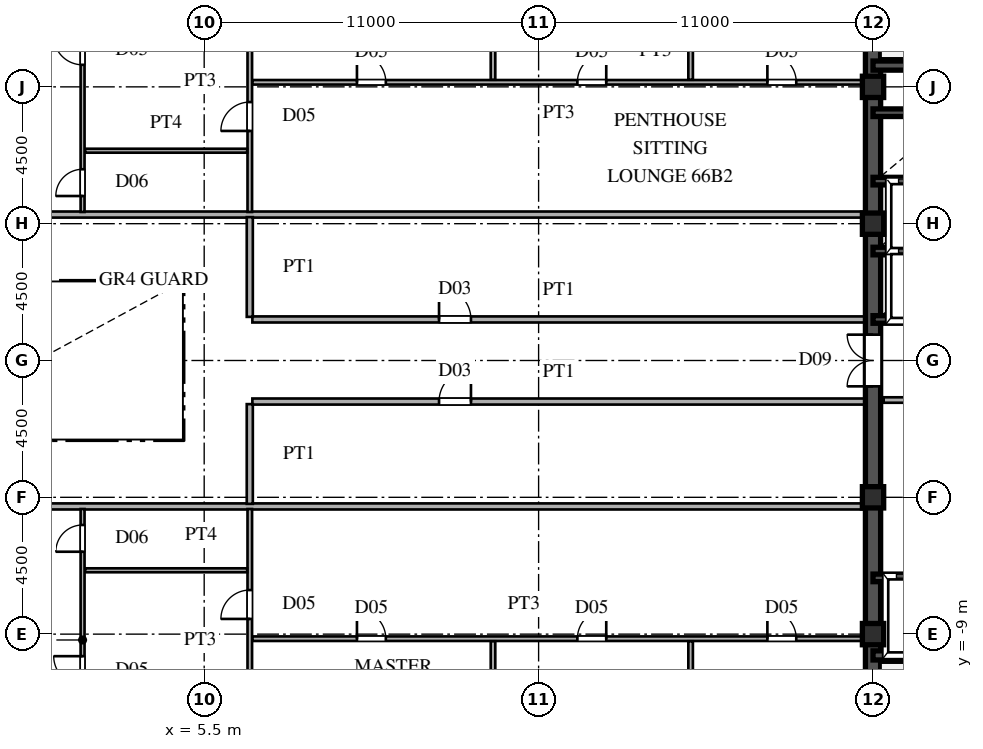
"""IFC4 building model, lengths in metres.
Left out: names, types, materials, properties, quantities, classifications, styles, units other than length and angle.
Written with IfcOpenShell. Run it as: python <this file> out.ifc"""

import sys

from ifc_helpers import new_model, si_unit, direction, frame, frame_2d, origin, origin_2d, place, context, subcontext, project, spatial, rectangle, hollow_rectangle, extrude, source, transform, mapped, element, fill, save


model = new_model("IFC4")
c1 = context("Model", 3, precision=1e-05, world=origin(), true_north=direction((0.0, 1.0)))
c2 = subcontext(c1, "Body", "Model", "MODEL_VIEW")
j1 = project(units=[si_unit("LENGTHUNIT", "METRE"), si_unit("PLANEANGLEUNIT", "RADIAN")], contexts=[c1])
p1 = place(None, origin())
s1 = spatial("IfcSite", under=j1, at=p1, CompositionType="ELEMENT")
p2 = place(p1, origin())
s2 = spatial("IfcBuilding", under=s1, at=p2, CompositionType="ELEMENT")
p3 = place(p2, frame((0.0, 0.0, 250.65)))
s3 = spatial("IfcBuildingStorey", under=s2, at=p3, CompositionType="ELEMENT", Elevation=250.65)
m1 = source(origin(), c2, "Body", "SweptSolid", [
    extrude(hollow_rectangle(XDim=0.7, YDim=0.7, WallThickness=0.03, at=origin_2d()), origin(), (0.0, 0.0, 1.0), 3.75),
])
for number, where, z_axis, x_axis in (
    (1, (27.5, -9.0, 0.0), (0.0, 0.0, 1.0), (1.0, 0.0, 0.0)),
    (2, (27.5, -4.5, 0.0), (0.0, 0.0, 1.0), (1.0, 0.0, 0.0)),
    (3, (27.5, 4.5, 0.0), (0.0, 0.0, 1.0), (1.0, 0.0, 0.0)),
    (4, (27.5, 9.0, 0.0), (0.0, 0.0, 1.0), (1.0, 0.0, 0.0)),
):
    element("IfcColumn", number, at=place(p3, frame(where, z_axis=z_axis, x_axis=x_axis)), inside=s3, PredefinedType="COLUMN", context=c2, shape_type="MappedRepresentation", body=[
        mapped(m1, transform((0.0, 0.0, 0.0), scale=1.0)),
    ])
for number, where, z_axis, x_axis in (
    (5, (27.5, -13.5, 0.0), (0.0, 0.0, 1.0), (0.0, 1.0, 0.0)),
    (6, (27.5, 1.3, 0.0), (0.0, 0.0, 1.0), (0.0, 1.0, 0.0)),
):
    element("IfcWall", number, at=place(p3, frame(where, z_axis=z_axis, x_axis=x_axis)), inside=s3, PredefinedType="SHEAR", context=c2, shape_type="SweptSolid", body=[
        extrude(rectangle(XDim=12.2, YDim=0.5, at=frame_2d((6.1, 0.0))), origin(), (0.0, 0.0, 1.0), 3.53),
    ])
p4 = place(p3, frame((27.5, -1.3, 0.0), z_axis=(0.0, 0.0, 1.0), x_axis=(0.0, 1.0, 0.0)))
e7 = element("IfcWall", 7, at=p4, inside=s3, PredefinedType="SHEAR", context=c2, shape_type="SweptSolid", body=[
    extrude(rectangle(XDim=2.6, YDim=0.5, at=frame_2d((1.3, 0.0))), origin(), (0.0, 0.0, 1.0), 3.53),
])
p5 = place(p4, frame((0.45, 0.0, 0.0)))
e8 = element("IfcOpeningElement", 8, at=p5, cuts=e7, PredefinedType="OPENING", context=c2, shape_type="SweptSolid", body=[
    extrude(rectangle(XDim=1.7, YDim=2.35, at=frame_2d((0.85, 1.175))), frame((0.0, 0.26, 0.0), z_axis=(0.0, -1.0, 0.0), x_axis=(1.0, 0.0, 0.0)), (0.0, 0.0, 1.0), 0.52),
])
p6 = place(p3, frame((27.5, -9.7, 0.0), z_axis=(0.0, 0.0, 1.0), x_axis=(1.0, 0.0, 0.0)))
e9 = element("IfcWall", 9, at=p6, inside=s3, PredefinedType="SHEAR", context=c2, shape_type="SweptSolid", body=[
    extrude(rectangle(XDim=9.0, YDim=0.3, at=frame_2d((4.5, 0.0))), origin(), (0.0, 0.0, 1.0), 3.53),
])
p7 = place(p6, frame((7.3, 0.0, 0.0)))
e10 = element("IfcOpeningElement", 10, at=p7, cuts=e9, PredefinedType="OPENING", context=c2, shape_type="SweptSolid", body=[
    extrude(rectangle(XDim=1.1, YDim=2.2, at=frame_2d((0.55, 1.1))), frame((0.0, 0.16, 0.0), z_axis=(0.0, -1.0, 0.0), x_axis=(1.0, 0.0, 0.0)), (0.0, 0.0, 1.0), 0.32),
])
p8 = place(p3, frame((27.5, 9.7, 0.0), z_axis=(0.0, 0.0, 1.0), x_axis=(1.0, 0.0, 0.0)))
e11 = element("IfcWall", 11, at=p8, inside=s3, PredefinedType="SHEAR", context=c2, shape_type="SweptSolid", body=[
    extrude(rectangle(XDim=9.0, YDim=0.3, at=frame_2d((4.5, 0.0))), origin(), (0.0, 0.0, 1.0), 3.53),
])
p9 = place(p8, frame((7.3, 0.0, 0.0)))
e12 = element("IfcOpeningElement", 12, at=p9, cuts=e11, PredefinedType="OPENING", context=c2, shape_type="SweptSolid", body=[
    extrude(rectangle(XDim=1.1, YDim=2.2, at=frame_2d((0.55, 1.1))), frame((0.0, 0.16, 0.0), z_axis=(0.0, -1.0, 0.0), x_axis=(1.0, 0.0, 0.0)), (0.0, 0.0, 1.0), 0.32),
])
for number, where, z_axis, x_axis in (
    (13, (27.5, -7.15, 0.0), (0.0, 0.0, 1.0), (1.0, 0.0, 0.0)),
    (14, (27.5, 1.35, 0.0), (0.0, 0.0, 1.0), (1.0, 0.0, 0.0)),
    (15, (27.5, 3.6, 0.0), (0.0, 0.0, 1.0), (1.0, 0.0, 0.0)),
    (16, (27.5, 5.9, 0.0), (0.0, 0.0, 1.0), (1.0, 0.0, 0.0)),
    (17, (27.5, 8.15, 0.0), (0.0, 0.0, 1.0), (1.0, 0.0, 0.0)),
):
    element("IfcWall", number, at=place(p3, frame(where, z_axis=z_axis, x_axis=x_axis)), inside=s3, PredefinedType="SHEAR", context=c2, shape_type="SweptSolid", body=[
        extrude(rectangle(XDim=2.8, YDim=0.25, at=frame_2d((1.4, 0.0))), origin(), (0.0, 0.0, 1.0), 3.53),
    ])
p10 = place(p3, frame((27.85, -1.3, 0.0), z_axis=(0.0, 0.0, 1.0), x_axis=(1.0, 0.0, 0.0)))
e18 = element("IfcWall", 18, at=p10, inside=s3, PredefinedType="PARTITIONING", context=c2, shape_type="SweptSolid", body=[
    extrude(rectangle(XDim=5.17, YDim=0.18, at=frame_2d((2.585, 0.0))), origin(), (0.0, 0.0, 1.0), 3.53),
])
p11 = place(p10, frame((2.01, 0.0, 0.0)))
e19 = element("IfcOpeningElement", 19, at=p11, cuts=e18, PredefinedType="OPENING", context=c2, shape_type="SweptSolid", body=[
    extrude(rectangle(XDim=1.15, YDim=2.2, at=frame_2d((0.575, 1.1))), frame((0.0, 0.1, 0.0), z_axis=(0.0, -1.0, 0.0), x_axis=(1.0, 0.0, 0.0)), (0.0, 0.0, 1.0), 0.2),
])
p12 = place(p3, frame((7.085, -9.15, 0.0), z_axis=(0.0, 0.0, 1.0), x_axis=(1.0, 0.0, 0.0)))
e20 = element("IfcWall", 20, at=p12, inside=s3, PredefinedType="PARTITIONING", context=c2, shape_type="SweptSolid", body=[
    extrude(rectangle(XDim=20.16, YDim=0.15, at=frame_2d((10.08, 0.0))), origin(), (0.0, 0.0, 1.0), 3.53),
])
p13 = place(p12, frame((3.44, 0.0, 0.0)))
e21 = element("IfcOpeningElement", 21, at=p13, cuts=e20, PredefinedType="OPENING", context=c2, shape_type="SweptSolid", body=[
    extrude(rectangle(XDim=0.95, YDim=2.15, at=frame_2d((0.475, 1.075))), frame((0.0, 0.085, 0.0), z_axis=(0.0, -1.0, 0.0), x_axis=(1.0, 0.0, 0.0)), (0.0, 0.0, 1.0), 0.17),
])
p14 = place(p12, frame((10.69, 0.0, 0.0)))
e22 = element("IfcOpeningElement", 22, at=p14, cuts=e20, PredefinedType="OPENING", context=c2, shape_type="SweptSolid", body=[
    extrude(rectangle(XDim=0.95, YDim=2.15, at=frame_2d((0.475, 1.075))), frame((0.0, 0.085, 0.0), z_axis=(0.0, -1.0, 0.0), x_axis=(1.0, 0.0, 0.0)), (0.0, 0.0, 1.0), 0.17),
])
p15 = place(p12, frame((16.94, 0.0, 0.0)))
e23 = element("IfcOpeningElement", 23, at=p15, cuts=e20, PredefinedType="OPENING", context=c2, shape_type="SweptSolid", body=[
    extrude(rectangle(XDim=0.95, YDim=2.15, at=frame_2d((0.475, 1.075))), frame((0.0, 0.085, 0.0), z_axis=(0.0, -1.0, 0.0), x_axis=(1.0, 0.0, 0.0)), (0.0, 0.0, 1.0), 0.17),
])
p16 = place(p3, frame((1.585, -6.9, 0.0), z_axis=(0.0, 0.0, 1.0), x_axis=(1.0, 0.0, 0.0)))
e24 = element("IfcWall", 24, at=p16, inside=s3, PredefinedType="PARTITIONING", context=c2, shape_type="SweptSolid", body=[
    extrude(rectangle(XDim=5.33, YDim=0.13, at=frame_2d((2.665, 0.0))), origin(), (0.0, 0.0, 1.0), 3.53),
])
p17 = place(p3, frame((-27.245, -4.8, 0.0), z_axis=(0.0, 0.0, 1.0), x_axis=(1.0, 0.0, 0.0)))
e25 = element("IfcWall", 25, at=p17, inside=s3, PredefinedType="PARTITIONING", context=c2, shape_type="SweptSolid", body=[
    extrude(rectangle(XDim=54.49, YDim=0.2, at=frame_2d((27.245, 0.0))), origin(), (0.0, 0.0, 1.0), 3.53),
])
p18 = place(p17, frame((24.97, 0.0, 0.0)))
e26 = element("IfcOpeningElement", 26, at=p18, cuts=e25, PredefinedType="OPENING", context=c2, shape_type="SweptSolid", body=[
    extrude(rectangle(XDim=1.05, YDim=2.25, at=frame_2d((0.525, 1.125))), frame((0.0, 0.11, 0.0), z_axis=(0.0, -1.0, 0.0), x_axis=(1.0, 0.0, 0.0)), (0.0, 0.0, 1.0), 0.22),
])
p19 = place(p3, frame((7.085, -1.35, 0.0), z_axis=(0.0, 0.0, 1.0), x_axis=(1.0, 0.0, 0.0)))
e27 = element("IfcWall", 27, at=p19, inside=s3, PredefinedType="PARTITIONING", context=c2, shape_type="SweptSolid", body=[
    extrude(rectangle(XDim=20.16, YDim=0.2, at=frame_2d((10.08, 0.0))), origin(), (0.0, 0.0, 1.0), 3.53),
])
p20 = place(p19, frame((6.14, 0.0, 0.0)))
e28 = element("IfcOpeningElement", 28, at=p20, cuts=e27, PredefinedType="OPENING", context=c2, shape_type="SweptSolid", body=[
    extrude(rectangle(XDim=1.05, YDim=2.25, at=frame_2d((0.525, 1.125))), frame((0.0, 0.11, 0.0), z_axis=(0.0, -1.0, 0.0), x_axis=(1.0, 0.0, 0.0)), (0.0, 0.0, 1.0), 0.22),
])
p21 = place(p3, frame((7.085, 1.35, 0.0), z_axis=(0.0, 0.0, 1.0), x_axis=(1.0, 0.0, 0.0)))
e29 = element("IfcWall", 29, at=p21, inside=s3, PredefinedType="PARTITIONING", context=c2, shape_type="SweptSolid", body=[
    extrude(rectangle(XDim=20.16, YDim=0.2, at=frame_2d((10.08, 0.0))), origin(), (0.0, 0.0, 1.0), 3.53),
])
p22 = place(p21, frame((6.14, 0.0, 0.0)))
e30 = element("IfcOpeningElement", 30, at=p22, cuts=e29, PredefinedType="OPENING", context=c2, shape_type="SweptSolid", body=[
    extrude(rectangle(XDim=1.05, YDim=2.25, at=frame_2d((0.525, 1.125))), frame((0.0, 0.11, 0.0), z_axis=(0.0, -1.0, 0.0), x_axis=(1.0, 0.0, 0.0)), (0.0, 0.0, 1.0), 0.22),
])
p23 = place(p3, frame((-27.245, 4.8, 0.0), z_axis=(0.0, 0.0, 1.0), x_axis=(1.0, 0.0, 0.0)))
e31 = element("IfcWall", 31, at=p23, inside=s3, PredefinedType="PARTITIONING", context=c2, shape_type="SweptSolid", body=[
    extrude(rectangle(XDim=54.49, YDim=0.2, at=frame_2d((27.245, 0.0))), origin(), (0.0, 0.0, 1.0), 3.53),
])
p24 = place(p23, frame((24.97, 0.0, 0.0)))
e32 = element("IfcOpeningElement", 32, at=p24, cuts=e31, PredefinedType="OPENING", context=c2, shape_type="SweptSolid", body=[
    extrude(rectangle(XDim=1.05, YDim=2.25, at=frame_2d((0.525, 1.125))), frame((0.0, 0.11, 0.0), z_axis=(0.0, -1.0, 0.0), x_axis=(1.0, 0.0, 0.0)), (0.0, 0.0, 1.0), 0.22),
])
p25 = place(p3, frame((1.585, 6.9, 0.0), z_axis=(0.0, 0.0, 1.0), x_axis=(1.0, 0.0, 0.0)))
e33 = element("IfcWall", 33, at=p25, inside=s3, PredefinedType="PARTITIONING", context=c2, shape_type="SweptSolid", body=[
    extrude(rectangle(XDim=5.33, YDim=0.13, at=frame_2d((2.665, 0.0))), origin(), (0.0, 0.0, 1.0), 3.53),
])
p26 = place(p3, frame((7.085, 9.15, 0.0), z_axis=(0.0, 0.0, 1.0), x_axis=(1.0, 0.0, 0.0)))
e34 = element("IfcWall", 34, at=p26, inside=s3, PredefinedType="PARTITIONING", context=c2, shape_type="SweptSolid", body=[
    extrude(rectangle(XDim=20.16, YDim=0.15, at=frame_2d((10.08, 0.0))), origin(), (0.0, 0.0, 1.0), 3.53),
])
p27 = place(p26, frame((3.44, 0.0, 0.0)))
e35 = element("IfcOpeningElement", 35, at=p27, cuts=e34, PredefinedType="OPENING", context=c2, shape_type="SweptSolid", body=[
    extrude(rectangle(XDim=0.95, YDim=2.15, at=frame_2d((0.475, 1.075))), frame((0.0, 0.085, 0.0), z_axis=(0.0, -1.0, 0.0), x_axis=(1.0, 0.0, 0.0)), (0.0, 0.0, 1.0), 0.17),
])
p28 = place(p26, frame((10.69, 0.0, 0.0)))
e36 = element("IfcOpeningElement", 36, at=p28, cuts=e34, PredefinedType="OPENING", context=c2, shape_type="SweptSolid", body=[
    extrude(rectangle(XDim=0.95, YDim=2.15, at=frame_2d((0.475, 1.075))), frame((0.0, 0.085, 0.0), z_axis=(0.0, -1.0, 0.0), x_axis=(1.0, 0.0, 0.0)), (0.0, 0.0, 1.0), 0.17),
])
p29 = place(p26, frame((16.94, 0.0, 0.0)))
e37 = element("IfcOpeningElement", 37, at=p29, cuts=e34, PredefinedType="OPENING", context=c2, shape_type="SweptSolid", body=[
    extrude(rectangle(XDim=0.95, YDim=2.15, at=frame_2d((0.475, 1.075))), frame((0.0, 0.085, 0.0), z_axis=(0.0, -1.0, 0.0), x_axis=(1.0, 0.0, 0.0)), (0.0, 0.0, 1.0), 0.17),
])
p30 = place(p3, frame((1.5, -13.5, 0.0), z_axis=(0.0, 0.0, 1.0), x_axis=(0.0, 1.0, 0.0)))
e38 = element("IfcWall", 38, at=p30, inside=s3, PredefinedType="PARTITIONING", context=c2, shape_type="SweptSolid", body=[
    extrude(rectangle(XDim=8.615, YDim=0.13, at=frame_2d((4.308, 0.0))), origin(), (0.0, 0.0, 1.0), 3.53),
])
p31 = place(p30, frame((7.21, 0.0, 0.0)))
e39 = element("IfcOpeningElement", 39, at=p31, cuts=e38, PredefinedType="OPENING", context=c2, shape_type="SweptSolid", body=[
    extrude(rectangle(XDim=0.88, YDim=2.1, at=frame_2d((0.44, 1.05))), frame((0.0, 0.075, 0.0), z_axis=(0.0, -1.0, 0.0), x_axis=(1.0, 0.0, 0.0)), (0.0, 0.0, 1.0), 0.15),
])
p32 = place(p30, frame((2.825, 0.0, 0.0)))
e40 = element("IfcOpeningElement", 40, at=p32, cuts=e38, PredefinedType="OPENING", context=c2, shape_type="SweptSolid", body=[
    extrude(rectangle(XDim=0.95, YDim=2.15, at=frame_2d((0.475, 1.075))), frame((0.0, 0.075, 0.0), z_axis=(0.0, -1.0, 0.0), x_axis=(1.0, 0.0, 0.0)), (0.0, 0.0, 1.0), 0.15),
])
p33 = place(p3, frame((1.5, 4.885, 0.0), z_axis=(0.0, 0.0, 1.0), x_axis=(0.0, 1.0, 0.0)))
e41 = element("IfcWall", 41, at=p33, inside=s3, PredefinedType="PARTITIONING", context=c2, shape_type="SweptSolid", body=[
    extrude(rectangle(XDim=8.615, YDim=0.13, at=frame_2d((4.308, 0.0))), origin(), (0.0, 0.0, 1.0), 3.53),
])
p34 = place(p33, frame((0.525, 0.0, 0.0)))
e42 = element("IfcOpeningElement", 42, at=p34, cuts=e41, PredefinedType="OPENING", context=c2, shape_type="SweptSolid", body=[
    extrude(rectangle(XDim=0.88, YDim=2.1, at=frame_2d((0.44, 1.05))), frame((0.0, 0.075, 0.0), z_axis=(0.0, -1.0, 0.0), x_axis=(1.0, 0.0, 0.0)), (0.0, 0.0, 1.0), 0.15),
])
p35 = place(p33, frame((4.84, 0.0, 0.0)))
e43 = element("IfcOpeningElement", 43, at=p35, cuts=e41, PredefinedType="OPENING", context=c2, shape_type="SweptSolid", body=[
    extrude(rectangle(XDim=0.95, YDim=2.15, at=frame_2d((0.475, 1.075))), frame((0.0, 0.075, 0.0), z_axis=(0.0, -1.0, 0.0), x_axis=(1.0, 0.0, 0.0)), (0.0, 0.0, 1.0), 0.15),
])
p36 = place(p3, frame((7.0, -13.5, 0.0), z_axis=(0.0, 0.0, 1.0), x_axis=(0.0, 1.0, 0.0)))
e44 = element("IfcWall", 44, at=p36, inside=s3, PredefinedType="PARTITIONING", context=c2, shape_type="SweptSolid", body=[
    extrude(rectangle(XDim=8.615, YDim=0.15, at=frame_2d((4.308, 0.0))), origin(), (0.0, 0.0, 1.0), 3.53),
])
p37 = place(p36, frame((5.0, 0.0, 0.0)))
e45 = element("IfcOpeningElement", 45, at=p37, cuts=e44, PredefinedType="OPENING", context=c2, shape_type="SweptSolid", body=[
    extrude(rectangle(XDim=0.95, YDim=2.15, at=frame_2d((0.475, 1.075))), frame((0.0, 0.085, 0.0), z_axis=(0.0, -1.0, 0.0), x_axis=(1.0, 0.0, 0.0)), (0.0, 0.0, 1.0), 0.17),
])
for number, where, z_axis, x_axis in (
    (46, (7.0, -4.715, 0.0), (0.0, 0.0, 1.0), (0.0, 1.0, 0.0)),
    (47, (7.0, 1.435, 0.0), (0.0, 0.0, 1.0), (0.0, 1.0, 0.0)),
):
    element("IfcWall", number, at=place(p3, frame(where, z_axis=z_axis, x_axis=x_axis)), inside=s3, PredefinedType="PARTITIONING", context=c2, shape_type="SweptSolid", body=[
        extrude(rectangle(XDim=3.28, YDim=0.2, at=frame_2d((1.64, 0.0))), origin(), (0.0, 0.0, 1.0), 3.53),
    ])
p38 = place(p3, frame((7.0, 4.885, 0.0), z_axis=(0.0, 0.0, 1.0), x_axis=(0.0, 1.0, 0.0)))
e48 = element("IfcWall", 48, at=p38, inside=s3, PredefinedType="PARTITIONING", context=c2, shape_type="SweptSolid", body=[
    extrude(rectangle(XDim=8.615, YDim=0.15, at=frame_2d((4.308, 0.0))), origin(), (0.0, 0.0, 1.0), 3.53),
])
p39 = place(p38, frame((2.665, 0.0, 0.0)))
e49 = element("IfcOpeningElement", 49, at=p39, cuts=e48, PredefinedType="OPENING", context=c2, shape_type="SweptSolid", body=[
    extrude(rectangle(XDim=0.95, YDim=2.15, at=frame_2d((0.475, 1.075))), frame((0.0, 0.085, 0.0), z_axis=(0.0, -1.0, 0.0), x_axis=(1.0, 0.0, 0.0)), (0.0, 0.0, 1.0), 0.17),
])
for number, where, z_axis, x_axis in (
    (50, (15.0, -13.5, 0.0), (0.0, 0.0, 1.0), (0.0, 1.0, 0.0)),
    (51, (15.0, 9.235, 0.0), (0.0, 0.0, 1.0), (0.0, 1.0, 0.0)),
):
    element("IfcWall", number, at=place(p3, frame(where, z_axis=z_axis, x_axis=x_axis)), inside=s3, PredefinedType="PARTITIONING", context=c2, shape_type="SweptSolid", body=[
        extrude(rectangle(XDim=4.265, YDim=0.15, at=frame_2d((2.132, 0.0))), origin(), (0.0, 0.0, 1.0), 3.53),
    ])
for number, where, z_axis, x_axis in (
    (52, (21.5, -13.39, 0.0), (0.0, 0.0, 1.0), (0.0, 1.0, 0.0)),
    (53, (21.5, 9.235, 0.0), (0.0, 0.0, 1.0), (0.0, 1.0, 0.0)),
):
    element("IfcWall", number, at=place(p3, frame(where, z_axis=z_axis, x_axis=x_axis)), inside=s3, PredefinedType="PARTITIONING", context=c2, shape_type="SweptSolid", body=[
        extrude(rectangle(XDim=4.155, YDim=0.15, at=frame_2d((2.077, 0.0))), origin(), (0.0, 0.0, 1.0), 3.53),
    ])
m2 = source(origin(), c2, "Body", "SweptSolid", [
    extrude(rectangle(XDim=1.7, YDim=2.35, at=frame_2d((0.85, 1.175))), frame((0.0, 0.025, 0.0), z_axis=(0.0, -1.0, 0.0), x_axis=(1.0, 0.0, 0.0)), (0.0, 0.0, 1.0), 0.05),
])
p40 = place(p5, origin())
e54 = element("IfcDoor", 54, at=p40, inside=s3, OperationType="DOUBLE_SWING_LEFT", PredefinedType="DOOR", context=c2, shape_type="MappedRepresentation", body=[
    mapped(m2, transform((0.0, 0.0, 0.0), scale=1.0)),
])
fill(e8, e54)
m3 = source(origin(), c2, "Body", "SweptSolid", [
    extrude(rectangle(XDim=0.95, YDim=2.15, at=frame_2d((0.475, 1.075))), frame((0.0, 0.025, 0.0), z_axis=(0.0, -1.0, 0.0), x_axis=(1.0, 0.0, 0.0)), (0.0, 0.0, 1.0), 0.05),
])
p41 = place(p13, origin())
e55 = element("IfcDoor", 55, at=p41, inside=s3, OperationType="SINGLE_SWING_LEFT", PredefinedType="DOOR", context=c2, shape_type="MappedRepresentation", body=[
    mapped(m3, transform((0.0, 0.0, 0.0), scale=1.0)),
])
fill(e21, e55)
p42 = place(p14, origin())
e56 = element("IfcDoor", 56, at=p42, inside=s3, OperationType="SINGLE_SWING_RIGHT", PredefinedType="DOOR", context=c2, shape_type="MappedRepresentation", body=[
    mapped(m3, transform((0.0, 0.0, 0.0), scale=1.0)),
])
fill(e22, e56)
p43 = place(p15, origin())
e57 = element("IfcDoor", 57, at=p43, inside=s3, OperationType="SINGLE_SWING_LEFT", PredefinedType="DOOR", context=c2, shape_type="MappedRepresentation", body=[
    mapped(m3, transform((0.0, 0.0, 0.0), scale=1.0)),
])
fill(e23, e57)
m4 = source(origin(), c2, "Body", "SweptSolid", [
    extrude(rectangle(XDim=1.05, YDim=2.25, at=frame_2d((0.525, 1.125))), frame((0.0, 0.025, 0.0), z_axis=(0.0, -1.0, 0.0), x_axis=(1.0, 0.0, 0.0)), (0.0, 0.0, 1.0), 0.05),
])
p44 = place(p20, origin())
e58 = element("IfcDoor", 58, at=p44, inside=s3, OperationType="SINGLE_SWING_RIGHT", PredefinedType="DOOR", context=c2, shape_type="MappedRepresentation", body=[
    mapped(m4, transform((0.0, 0.0, 0.0), scale=1.0)),
])
fill(e28, e58)
p45 = place(p22, origin())
e59 = element("IfcDoor", 59, at=p45, inside=s3, OperationType="SINGLE_SWING_LEFT", PredefinedType="DOOR", context=c2, shape_type="MappedRepresentation", body=[
    mapped(m4, transform((0.0, 0.0, 0.0), scale=1.0)),
])
fill(e30, e59)
p46 = place(p27, origin())
e60 = element("IfcDoor", 60, at=p46, inside=s3, OperationType="SINGLE_SWING_LEFT", PredefinedType="DOOR", context=c2, shape_type="MappedRepresentation", body=[
    mapped(m3, transform((0.0, 0.0, 0.0), scale=1.0)),
])
fill(e35, e60)
p47 = place(p28, origin())
e61 = element("IfcDoor", 61, at=p47, inside=s3, OperationType="SINGLE_SWING_RIGHT", PredefinedType="DOOR", context=c2, shape_type="MappedRepresentation", body=[
    mapped(m3, transform((0.0, 0.0, 0.0), scale=1.0)),
])
fill(e36, e61)
p48 = place(p29, origin())
e62 = element("IfcDoor", 62, at=p48, inside=s3, OperationType="SINGLE_SWING_LEFT", PredefinedType="DOOR", context=c2, shape_type="MappedRepresentation", body=[
    mapped(m3, transform((0.0, 0.0, 0.0), scale=1.0)),
])
fill(e37, e62)
m5 = source(origin(), c2, "Body", "SweptSolid", [
    extrude(rectangle(XDim=0.88, YDim=2.1, at=frame_2d((0.44, 1.05))), frame((0.0, 0.025, 0.0), z_axis=(0.0, -1.0, 0.0), x_axis=(1.0, 0.0, 0.0)), (0.0, 0.0, 1.0), 0.05),
])
p49 = place(p31, origin())
e63 = element("IfcDoor", 63, at=p49, inside=s3, OperationType="SINGLE_SWING_LEFT", PredefinedType="DOOR", context=c2, shape_type="MappedRepresentation", body=[
    mapped(m5, transform((0.0, 0.0, 0.0), scale=1.0)),
])
fill(e39, e63)
p50 = place(p32, origin())
e64 = element("IfcDoor", 64, at=p50, inside=s3, OperationType="SINGLE_SWING_RIGHT", PredefinedType="DOOR", context=c2, shape_type="MappedRepresentation", body=[
    mapped(m3, transform((0.0, 0.0, 0.0), scale=1.0)),
])
fill(e40, e64)
p51 = place(p34, origin())
e65 = element("IfcDoor", 65, at=p51, inside=s3, OperationType="SINGLE_SWING_LEFT", PredefinedType="DOOR", context=c2, shape_type="MappedRepresentation", body=[
    mapped(m5, transform((0.0, 0.0, 0.0), scale=1.0)),
])
fill(e42, e65)
p52 = place(p35, origin())
e66 = element("IfcDoor", 66, at=p52, inside=s3, OperationType="SINGLE_SWING_RIGHT", PredefinedType="DOOR", context=c2, shape_type="MappedRepresentation", body=[
    mapped(m3, transform((0.0, 0.0, 0.0), scale=1.0)),
])
fill(e43, e66)
p53 = place(p37, origin())
e67 = element("IfcDoor", 67, at=p53, inside=s3, OperationType="SINGLE_SWING_LEFT", PredefinedType="DOOR", context=c2, shape_type="MappedRepresentation", body=[
    mapped(m3, transform((0.0, 0.0, 0.0), scale=1.0)),
])
fill(e45, e67)
p54 = place(p39, origin())
e68 = element("IfcDoor", 68, at=p54, inside=s3, OperationType="SINGLE_SWING_LEFT", PredefinedType="DOOR", context=c2, shape_type="MappedRepresentation", body=[
    mapped(m3, transform((0.0, 0.0, 0.0), scale=1.0)),
])
fill(e49, e68)
save(model, sys.argv[1])
